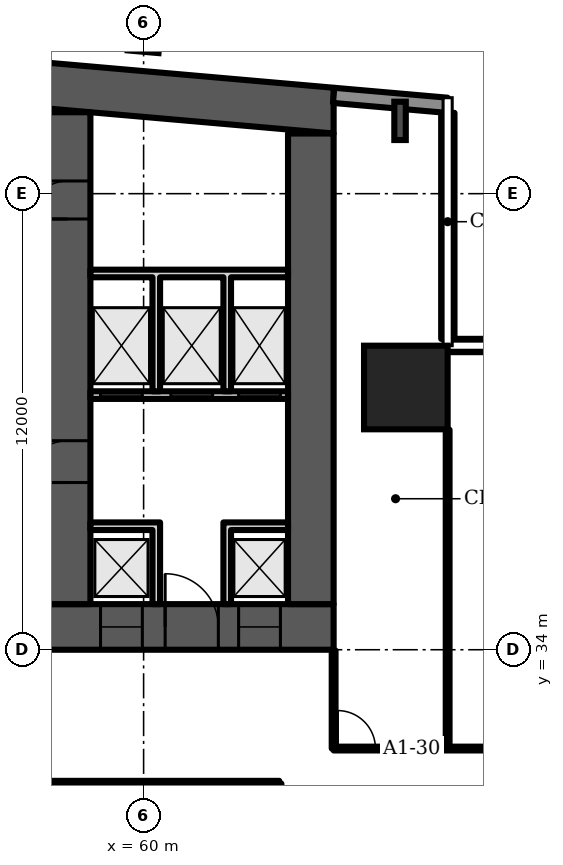
"""IFC4 building model, lengths in metres.
Left out: names, types, materials, properties, quantities, classifications, styles, units other than length and angle.
Written with IfcOpenShell. Run it as: python <this file> out.ifc"""

import sys

from ifc_helpers import new_model, si_unit, direction, frame, frame_2d, origin, origin_2d, place, context, subcontext, project, spatial, polyline, rectangle, i_section, outline, extrude, element, fill, save


model = new_model("IFC4")
c1 = context("Model", 3, precision=1e-05, world=origin(), true_north=direction((0.0, 1.0)))
c2 = subcontext(c1, "Body", "Model", "MODEL_VIEW")
j1 = project(units=[si_unit("LENGTHUNIT", "METRE"), si_unit("PLANEANGLEUNIT", "RADIAN")], contexts=[c1])
p1 = place(None, origin())
s1 = spatial("IfcSite", under=j1, at=p1, CompositionType="ELEMENT")
p2 = place(p1, origin())
s2 = spatial("IfcBuilding", under=s1, at=p2, CompositionType="ELEMENT")
p3 = place(p2, frame((0.0, 0.0, 45.1)))
s3 = spatial("IfcBuildingStorey", under=s2, at=p3, CompositionType="ELEMENT", Elevation=45.1)
p4 = place(p3, frame((0.0, 0.0, -0.0)))
e1 = element("IfcWall", 1, at=p4, inside=s3, PredefinedType="SHEAR", context=c2, shape_type="SweptSolid", body=[
    extrude(outline(polyline([(9.0, 47.583), (37.0, 50.032), (65.0, 47.583), (65.0, 48.787), (37.0, 51.237), (9.0, 48.787), (9.0, 47.583)])), origin(), (0.0, 0.0, 1.0), 3.6),
])
p5 = place(p3, frame((9.0, 34.6, 0.0), z_axis=(0.0, 0.0, 1.0), x_axis=(1.0, 0.0, 0.0)))
e2 = element("IfcWall", 2, at=p5, inside=s3, PredefinedType="SHEAR", context=c2, shape_type="SweptSolid", body=[
    extrude(rectangle(XDim=56.0, YDim=1.2, at=frame_2d((28.0, 0.0))), origin(), (0.0, 0.0, 1.0), 3.6),
])
p6 = place(p5, frame((2.0, 0.0, 0.0)))
e3 = element("IfcOpeningElement", 3, at=p6, cuts=e2, PredefinedType="OPENING", context=c2, shape_type="SweptSolid", body=[
    extrude(rectangle(XDim=1.0, YDim=2.1, at=frame_2d((0.5, 1.05))), frame((0.0, 0.61, 0.0), z_axis=(0.0, -1.0, 0.0), x_axis=(1.0, 0.0, 0.0)), (0.0, 0.0, 1.0), 1.22),
])
p7 = place(p5, frame((4.6, 0.0, 0.0)))
e4 = element("IfcOpeningElement", 4, at=p7, cuts=e2, PredefinedType="OPENING", context=c2, shape_type="SweptSolid", body=[
    extrude(rectangle(XDim=1.0, YDim=2.1, at=frame_2d((0.5, 1.05))), frame((0.0, 0.61, 0.0), z_axis=(0.0, -1.0, 0.0), x_axis=(1.0, 0.0, 0.0)), (0.0, 0.0, 1.0), 1.22),
])
p8 = place(p5, frame((7.867, 0.0, 0.0)))
e5 = element("IfcOpeningElement", 5, at=p8, cuts=e2, PredefinedType="OPENING", context=c2, shape_type="SweptSolid", body=[
    extrude(rectangle(XDim=1.1, YDim=2.1, at=frame_2d((0.55, 1.05))), frame((0.0, 0.61, 0.0), z_axis=(0.0, -1.0, 0.0), x_axis=(1.0, 0.0, 0.0)), (0.0, 0.0, 1.0), 1.22),
])
p9 = place(p5, frame((12.033, 0.0, 0.0)))
e6 = element("IfcOpeningElement", 6, at=p9, cuts=e2, PredefinedType="OPENING", context=c2, shape_type="SweptSolid", body=[
    extrude(rectangle(XDim=1.1, YDim=2.1, at=frame_2d((0.55, 1.05))), frame((0.0, 0.61, 0.0), z_axis=(0.0, -1.0, 0.0), x_axis=(1.0, 0.0, 0.0)), (0.0, 0.0, 1.0), 1.22),
])
p10 = place(p5, frame((9.8, 0.0, 0.0)))
e7 = element("IfcOpeningElement", 7, at=p10, cuts=e2, PredefinedType="OPENING", context=c2, shape_type="SweptSolid", body=[
    extrude(rectangle(XDim=1.4, YDim=2.1, at=frame_2d((0.7, 1.05))), frame((0.0, 0.61, 0.0), z_axis=(0.0, -1.0, 0.0), x_axis=(1.0, 0.0, 0.0)), (0.0, 0.0, 1.0), 1.22),
])
p11 = place(p5, frame((14.65, 0.0, 0.0)))
e8 = element("IfcOpeningElement", 8, at=p11, cuts=e2, PredefinedType="OPENING", context=c2, shape_type="SweptSolid", body=[
    extrude(rectangle(XDim=1.2, YDim=2.1, at=frame_2d((0.6, 1.05))), frame((0.0, 0.61, 0.0), z_axis=(0.0, -1.0, 0.0), x_axis=(1.0, 0.0, 0.0)), (0.0, 0.0, 1.0), 1.22),
])
p12 = place(p5, frame((21.867, 0.0, 0.0)))
e9 = element("IfcOpeningElement", 9, at=p12, cuts=e2, PredefinedType="OPENING", context=c2, shape_type="SweptSolid", body=[
    extrude(rectangle(XDim=1.1, YDim=2.1, at=frame_2d((0.55, 1.05))), frame((0.0, 0.61, 0.0), z_axis=(0.0, -1.0, 0.0), x_axis=(1.0, 0.0, 0.0)), (0.0, 0.0, 1.0), 1.22),
])
p13 = place(p5, frame((26.033, 0.0, 0.0)))
e10 = element("IfcOpeningElement", 10, at=p13, cuts=e2, PredefinedType="OPENING", context=c2, shape_type="SweptSolid", body=[
    extrude(rectangle(XDim=1.1, YDim=2.1, at=frame_2d((0.55, 1.05))), frame((0.0, 0.61, 0.0), z_axis=(0.0, -1.0, 0.0), x_axis=(1.0, 0.0, 0.0)), (0.0, 0.0, 1.0), 1.22),
])
p14 = place(p5, frame((23.8, 0.0, 0.0)))
e11 = element("IfcOpeningElement", 11, at=p14, cuts=e2, PredefinedType="OPENING", context=c2, shape_type="SweptSolid", body=[
    extrude(rectangle(XDim=1.4, YDim=2.1, at=frame_2d((0.7, 1.05))), frame((0.0, 0.61, 0.0), z_axis=(0.0, -1.0, 0.0), x_axis=(1.0, 0.0, 0.0)), (0.0, 0.0, 1.0), 1.22),
])
p15 = place(p5, frame((28.867, 0.0, 0.0)))
e12 = element("IfcOpeningElement", 12, at=p15, cuts=e2, PredefinedType="OPENING", context=c2, shape_type="SweptSolid", body=[
    extrude(rectangle(XDim=1.1, YDim=2.1, at=frame_2d((0.55, 1.05))), frame((0.0, 0.61, 0.0), z_axis=(0.0, -1.0, 0.0), x_axis=(1.0, 0.0, 0.0)), (0.0, 0.0, 1.0), 1.22),
])
p16 = place(p5, frame((33.033, 0.0, 0.0)))
e13 = element("IfcOpeningElement", 13, at=p16, cuts=e2, PredefinedType="OPENING", context=c2, shape_type="SweptSolid", body=[
    extrude(rectangle(XDim=1.1, YDim=2.1, at=frame_2d((0.55, 1.05))), frame((0.0, 0.61, 0.0), z_axis=(0.0, -1.0, 0.0), x_axis=(1.0, 0.0, 0.0)), (0.0, 0.0, 1.0), 1.22),
])
p17 = place(p5, frame((40.15, 0.0, 0.0)))
e14 = element("IfcOpeningElement", 14, at=p17, cuts=e2, PredefinedType="OPENING", context=c2, shape_type="SweptSolid", body=[
    extrude(rectangle(XDim=1.2, YDim=2.1, at=frame_2d((0.6, 1.05))), frame((0.0, 0.61, 0.0), z_axis=(0.0, -1.0, 0.0), x_axis=(1.0, 0.0, 0.0)), (0.0, 0.0, 1.0), 1.22),
])
p18 = place(p5, frame((44.8, 0.0, 0.0)))
e15 = element("IfcOpeningElement", 15, at=p18, cuts=e2, PredefinedType="OPENING", context=c2, shape_type="SweptSolid", body=[
    extrude(rectangle(XDim=1.4, YDim=2.1, at=frame_2d((0.7, 1.05))), frame((0.0, 0.61, 0.0), z_axis=(0.0, -1.0, 0.0), x_axis=(1.0, 0.0, 0.0)), (0.0, 0.0, 1.0), 1.22),
])
p19 = place(p5, frame((49.867, 0.0, 0.0)))
e16 = element("IfcOpeningElement", 16, at=p19, cuts=e2, PredefinedType="OPENING", context=c2, shape_type="SweptSolid", body=[
    extrude(rectangle(XDim=1.1, YDim=2.1, at=frame_2d((0.55, 1.05))), frame((0.0, 0.61, 0.0), z_axis=(0.0, -1.0, 0.0), x_axis=(1.0, 0.0, 0.0)), (0.0, 0.0, 1.0), 1.22),
])
p20 = place(p5, frame((53.5, 0.0, 0.0)))
e17 = element("IfcOpeningElement", 17, at=p20, cuts=e2, PredefinedType="OPENING", context=c2, shape_type="SweptSolid", body=[
    extrude(rectangle(XDim=1.1, YDim=2.1, at=frame_2d((0.55, 1.05))), frame((0.0, 0.61, 0.0), z_axis=(0.0, -1.0, 0.0), x_axis=(1.0, 0.0, 0.0)), (0.0, 0.0, 1.0), 1.22),
])
p21 = place(p5, frame((51.567, 0.0, 0.0)))
e18 = element("IfcOpeningElement", 18, at=p21, cuts=e2, PredefinedType="OPENING", context=c2, shape_type="SweptSolid", body=[
    extrude(rectangle(XDim=1.4, YDim=2.1, at=frame_2d((0.7, 1.05))), frame((0.0, 0.61, 0.0), z_axis=(0.0, -1.0, 0.0), x_axis=(1.0, 0.0, 0.0)), (0.0, 0.0, 1.0), 1.22),
])
p22 = place(p3, frame((58.0, 35.2, 0.0), z_axis=(0.0, 0.0, 1.0), x_axis=(0.0, 1.0, 0.0)))
e19 = element("IfcWall", 19, at=p22, inside=s3, PredefinedType="SHEAR", context=c2, shape_type="SweptSolid", body=[
    extrude(rectangle(XDim=12.943, YDim=1.2, at=frame_2d((6.471, 0.0))), origin(), (0.0, 0.0, 1.0), 3.6),
])
p23 = place(p22, frame((10.134, 0.0, 0.0)))
e20 = element("IfcOpeningElement", 20, at=p23, cuts=e19, PredefinedType="OPENING", context=c2, shape_type="SweptSolid", body=[
    extrude(rectangle(XDim=1.0, YDim=2.1, at=frame_2d((0.5, 1.05))), frame((0.0, 0.61, 0.0), z_axis=(0.0, -1.0, 0.0), x_axis=(1.0, 0.0, 0.0)), (0.0, 0.0, 1.0), 1.22),
])
p24 = place(p22, frame((3.2, 0.0, 0.0)))
e21 = element("IfcOpeningElement", 21, at=p24, cuts=e19, PredefinedType="OPENING", context=c2, shape_type="SweptSolid", body=[
    extrude(rectangle(XDim=1.1, YDim=2.1, at=frame_2d((0.55, 1.05))), frame((0.0, 0.61, 0.0), z_axis=(0.0, -1.0, 0.0), x_axis=(1.0, 0.0, 0.0)), (0.0, 0.0, 1.0), 1.22),
])
p25 = place(p3, frame((64.4, 35.2, 0.0), z_axis=(0.0, 0.0, 1.0), x_axis=(0.0, 1.0, 0.0)))
e22 = element("IfcWall", 22, at=p25, inside=s3, PredefinedType="SHEAR", context=c2, shape_type="SweptSolid", body=[
    extrude(rectangle(XDim=12.383, YDim=1.2, at=frame_2d((6.191, 0.0))), origin(), (0.0, 0.0, 1.0), 3.6),
])
p26 = place(p3, frame((66.9, 40.9, 0.0), z_axis=(0.0, 0.0, 1.0), x_axis=(1.0, 0.0, 0.0)))
e23 = element("IfcColumn", 23, at=p26, inside=s3, PredefinedType="COLUMN", context=c2, shape_type="SweptSolid", body=[
    extrude(rectangle(XDim=2.2, YDim=2.2, at=origin_2d()), origin(), (0.0, 0.0, 1.0), 3.6),
])
p27 = place(p3, frame((66.748, 47.915, 0.0), z_axis=(0.0, 0.0, 1.0), x_axis=(1.0, 0.0, 0.0)))
e24 = element("IfcColumn", 24, at=p27, inside=s3, PredefinedType="COLUMN", context=c2, shape_type="SweptSolid", body=[
    extrude(i_section(OverallWidth=0.302, OverallDepth=1.008, WebThickness=0.021, FlangeThickness=0.04, FilletRadius=0.03, at=origin_2d()), origin(), (0.0, 0.0, 1.0), 3.6),
])
p28 = place(p3, frame((60.0, 49.885, 0.0), z_axis=(0.0, 0.0, 1.0), x_axis=(0.087156, 0.996197, 0.0)))
e25 = element("IfcColumn", 25, at=p28, inside=s3, PredefinedType="COLUMN", context=c2, shape_type="SweptSolid", body=[
    extrude(i_section(OverallWidth=0.303, OverallDepth=0.814, WebThickness=0.021, FlangeThickness=0.04, FilletRadius=0.03, at=origin_2d()), origin(), (0.0, 0.0, 1.0), 3.6),
])
p29 = place(p3, frame((67.983, 48.326, 0.0), z_axis=(0.0, 0.0, 1.0), x_axis=(-0.996194, 0.087168, 0.0)))
e26 = element("IfcWall", 26, at=p29, inside=s3, PredefinedType="SOLIDWALL", context=c2, shape_type="SweptSolid", body=[
    extrude(rectangle(XDim=2.994, YDim=0.4, at=frame_2d((1.497, 0.0))), origin(), (0.0, 0.0, 1.0), 3.2),
])
p30 = place(p3, frame((76.047, 42.005, 0.0), z_axis=(0.0, 0.0, 1.0), x_axis=(-1.0, 0.0, 0.0)))
e27 = element("IfcWall", 27, at=p30, inside=s3, PredefinedType="SOLIDWALL", context=c2, shape_type="SweptSolid", body=[
    extrude(rectangle(XDim=8.047, YDim=0.35, at=frame_2d((4.023, 0.0))), origin(), (0.0, 0.0, 1.0), 1.0),
])
p31 = place(p3, frame((68.005, 42.18, 0.0), z_axis=(0.0, 0.0, 1.0), x_axis=(0.0, 1.0, 0.0)))
e28 = element("IfcWall", 28, at=p31, inside=s3, PredefinedType="SOLIDWALL", context=c2, shape_type="SweptSolid", body=[
    extrude(rectangle(XDim=5.947, YDim=0.35, at=frame_2d((2.973, 0.0))), origin(), (0.0, 0.0, 1.0), 1.0),
])
p32 = place(p3, frame((58.6, 40.7, 0.0), z_axis=(0.0, 0.0, 1.0), x_axis=(1.0, 0.0, 0.0)))
e29 = element("IfcWall", 29, at=p32, inside=s3, PredefinedType="PARTITIONING", context=c2, shape_type="SweptSolid", body=[
    extrude(rectangle(XDim=5.2, YDim=0.2, at=frame_2d((2.6, 0.0))), origin(), (0.0, 0.0, 1.0), 3.2),
])
p33 = place(p32, frame((0.267, 0.0, 0.0)))
e30 = element("IfcOpeningElement", 30, at=p33, cuts=e29, PredefinedType="OPENING", context=c2, shape_type="SweptSolid", body=[
    extrude(rectangle(XDim=1.1, YDim=2.1, at=frame_2d((0.55, 1.05))), frame((0.0, 0.11, 0.0), z_axis=(0.0, -1.0, 0.0), x_axis=(1.0, 0.0, 0.0)), (0.0, 0.0, 1.0), 0.22),
])
p34 = place(p32, frame((2.117, 0.0, 0.0)))
e31 = element("IfcOpeningElement", 31, at=p34, cuts=e29, PredefinedType="OPENING", context=c2, shape_type="SweptSolid", body=[
    extrude(rectangle(XDim=1.1, YDim=2.1, at=frame_2d((0.55, 1.05))), frame((0.0, 0.11, 0.0), z_axis=(0.0, -1.0, 0.0), x_axis=(1.0, 0.0, 0.0)), (0.0, 0.0, 1.0), 0.22),
])
p35 = place(p32, frame((3.9, 0.0, 0.0)))
e32 = element("IfcOpeningElement", 32, at=p35, cuts=e29, PredefinedType="OPENING", context=c2, shape_type="SweptSolid", body=[
    extrude(rectangle(XDim=1.1, YDim=2.1, at=frame_2d((0.55, 1.05))), frame((0.0, 0.11, 0.0), z_axis=(0.0, -1.0, 0.0), x_axis=(1.0, 0.0, 0.0)), (0.0, 0.0, 1.0), 0.22),
])
p36 = place(p3, frame((0.0, 0.0, -0.0)))
e33 = element("IfcWall", 33, at=p36, inside=s3, PredefinedType="PARTITIONING", context=c2, shape_type="SweptSolid", body=[
    extrude(outline(polyline([(60.233, 37.15), (58.6, 37.15), (58.6, 37.35), (60.233, 37.35), (60.433, 37.35), (60.433, 35.2), (60.233, 35.2), (60.233, 37.15)])), origin(), (0.0, 0.0, 1.0), 3.2),
])
p37 = place(p3, frame((0.0, 0.0, -0.0)))
e34 = element("IfcWall", 34, at=p37, inside=s3, PredefinedType="PARTITIONING", context=c2, shape_type="SweptSolid", body=[
    extrude(outline(polyline([(62.1, 37.35), (62.3, 37.35), (63.8, 37.35), (63.8, 37.15), (62.3, 37.15), (62.3, 35.2), (62.1, 35.2), (62.1, 37.35)])), origin(), (0.0, 0.0, 1.0), 3.2),
])
p38 = place(p3, frame((0.0, 0.0, -0.0)))
e35 = element("IfcWall", 35, at=p38, inside=s3, PredefinedType="PARTITIONING", context=c2, shape_type="SweptSolid", body=[
    extrude(outline(polyline([(60.433, 40.8), (60.233, 40.8), (60.233, 43.8), (58.6, 43.8), (58.6, 44.0), (63.8, 44.0), (63.8, 43.8), (62.3, 43.8), (62.3, 40.8), (62.1, 40.8), (62.1, 43.8), (60.433, 43.8), (60.433, 40.8)])), origin(), (0.0, 0.0, 1.0), 3.2),
])
p39 = place(p3, frame((57.67, 14.24, 0.0), z_axis=(0.0, 0.0, 1.0), x_axis=(0.0, 1.0, 0.0)))
e36 = element("IfcWall", 36, at=p39, inside=s3, PredefinedType="PARTITIONING", context=c2, shape_type="SweptSolid", body=[
    extrude(rectangle(XDim=16.26, YDim=0.1, at=frame_2d((8.13, 0.0))), origin(), (0.0, 0.0, 1.0), 3.2),
])
p40 = place(p3, frame((63.57, 14.245, 0.0), z_axis=(0.0, 0.0, 1.0), x_axis=(0.000331, 1.000002, 0.0)))
e37 = element("IfcWall", 37, at=p40, inside=s3, PredefinedType="PARTITIONING", context=c2, shape_type="SweptSolid", body=[
    extrude(rectangle(XDim=16.233, YDim=0.1, at=frame_2d((8.117, 0.0))), origin(), (0.0, 0.0, 1.0), 3.2),
])
p41 = place(p3, frame((65.0, 31.4, 0.0), z_axis=(0.0, 0.0, 1.0), x_axis=(0.0, 1.0, 0.0)))
e38 = element("IfcWall", 38, at=p41, inside=s3, PredefinedType="PARTITIONING", context=c2, shape_type="SweptSolid", body=[
    extrude(rectangle(XDim=2.58, YDim=0.1, at=frame_2d((1.29, 0.0))), origin(), (0.0, 0.0, 1.0), 3.2),
])
p42 = place(p3, frame((65.0, 31.4, 0.0), z_axis=(0.0, 0.0, 1.0), x_axis=(1.0, 0.0, 0.0)))
e39 = element("IfcWall", 39, at=p42, inside=s3, PredefinedType="PARTITIONING", context=c2, shape_type="SweptSolid", body=[
    extrude(rectangle(XDim=7.125, YDim=0.1, at=frame_2d((3.562, 0.0))), origin(), (0.0, 0.0, 1.0), 3.2),
])
p43 = place(p42, frame((0.1, 0.0, 0.0)))
e40 = element("IfcOpeningElement", 40, at=p43, cuts=e39, PredefinedType="OPENING", context=c2, shape_type="SweptSolid", body=[
    extrude(rectangle(XDim=1.0, YDim=2.1, at=frame_2d((0.5, 1.05))), frame((0.0, 0.06, 0.0), z_axis=(0.0, -1.0, 0.0), x_axis=(1.0, 0.0, 0.0)), (0.0, 0.0, 1.0), 0.12),
])
p44 = place(p42, frame((5.625, 0.0, 0.0)))
e41 = element("IfcOpeningElement", 41, at=p44, cuts=e39, PredefinedType="OPENING", context=c2, shape_type="SweptSolid", body=[
    extrude(rectangle(XDim=1.0, YDim=2.1, at=frame_2d((0.5, 1.05))), frame((0.0, 0.06, 0.0), z_axis=(0.0, -1.0, 0.0), x_axis=(1.0, 0.0, 0.0)), (0.0, 0.0, 1.0), 0.12),
])
p45 = place(p3, frame((68.0, 31.4, 0.0), z_axis=(0.0, 0.0, 1.0), x_axis=(0.0, 1.0, 0.0)))
e42 = element("IfcWall", 42, at=p45, inside=s3, PredefinedType="PARTITIONING", context=c2, shape_type="SweptSolid", body=[
    extrude(rectangle(XDim=8.39, YDim=0.1, at=frame_2d((4.195, 0.0))), origin(), (0.0, 0.0, 1.0), 3.2),
])
p46 = place(p3, frame((44.15, 30.5, 0.0), z_axis=(0.0, 0.0, 1.0), x_axis=(1.0, 0.0, 0.0)))
e43 = element("IfcWall", 43, at=p46, inside=s3, PredefinedType="PARTITIONING", context=c2, shape_type="SweptSolid", body=[
    extrude(rectangle(XDim=19.42, YDim=0.1, at=frame_2d((9.71, 0.0))), origin(), (0.0, 0.0, 1.0), 3.2),
])
p47 = place(p46, frame((15.54, 0.0, 0.0)))
e44 = element("IfcOpeningElement", 44, at=p47, cuts=e43, PredefinedType="OPENING", context=c2, shape_type="SweptSolid", body=[
    extrude(rectangle(XDim=1.0, YDim=2.1, at=frame_2d((0.5, 1.05))), frame((0.0, 0.06, 0.0), z_axis=(0.0, -1.0, 0.0), x_axis=(1.0, 0.0, 0.0)), (0.0, 0.0, 1.0), 0.12),
])
p48 = place(p19, origin())
e45 = element("IfcDoor", 45, at=p48, inside=s3, OperationType="DOUBLE_DOOR_SLIDING", PredefinedType="DOOR", context=c2, shape_type="SweptSolid", body=[
    extrude(rectangle(XDim=1.1, YDim=2.1, at=frame_2d((0.55, 1.05))), frame((0.0, 0.025, 0.0), z_axis=(0.0, -1.0, 0.0), x_axis=(1.0, 0.0, 0.0)), (0.0, 0.0, 1.0), 0.05),
])
fill(e16, e45)
p49 = place(p20, origin())
e46 = element("IfcDoor", 46, at=p49, inside=s3, OperationType="DOUBLE_DOOR_SLIDING", PredefinedType="DOOR", context=c2, shape_type="SweptSolid", body=[
    extrude(rectangle(XDim=1.1, YDim=2.1, at=frame_2d((0.55, 1.05))), frame((0.0, 0.025, 0.0), z_axis=(0.0, -1.0, 0.0), x_axis=(1.0, 0.0, 0.0)), (0.0, 0.0, 1.0), 0.05),
])
fill(e17, e46)
p50 = place(p21, origin())
e47 = element("IfcDoor", 47, at=p50, inside=s3, OperationType="DOUBLE_DOOR_SINGLE_SWING", PredefinedType="DOOR", context=c2, shape_type="SweptSolid", body=[
    extrude(rectangle(XDim=1.4, YDim=2.1, at=frame_2d((0.7, 1.05))), frame((0.0, 0.025, 0.0), z_axis=(0.0, -1.0, 0.0), x_axis=(1.0, 0.0, 0.0)), (0.0, 0.0, 1.0), 0.05),
])
fill(e18, e47)
p51 = place(p33, origin())
e48 = element("IfcDoor", 48, at=p51, inside=s3, OperationType="DOUBLE_DOOR_SLIDING", PredefinedType="DOOR", context=c2, shape_type="SweptSolid", body=[
    extrude(rectangle(XDim=1.1, YDim=2.1, at=frame_2d((0.55, 1.05))), frame((0.0, 0.025, 0.0), z_axis=(0.0, -1.0, 0.0), x_axis=(1.0, 0.0, 0.0)), (0.0, 0.0, 1.0), 0.05),
])
fill(e30, e48)
p52 = place(p34, origin())
e49 = element("IfcDoor", 49, at=p52, inside=s3, OperationType="DOUBLE_DOOR_SLIDING", PredefinedType="DOOR", context=c2, shape_type="SweptSolid", body=[
    extrude(rectangle(XDim=1.1, YDim=2.1, at=frame_2d((0.55, 1.05))), frame((0.0, 0.025, 0.0), z_axis=(0.0, -1.0, 0.0), x_axis=(1.0, 0.0, 0.0)), (0.0, 0.0, 1.0), 0.05),
])
fill(e31, e49)
p53 = place(p35, origin())
e50 = element("IfcDoor", 50, at=p53, inside=s3, OperationType="DOUBLE_DOOR_SLIDING", PredefinedType="DOOR", context=c2, shape_type="SweptSolid", body=[
    extrude(rectangle(XDim=1.1, YDim=2.1, at=frame_2d((0.55, 1.05))), frame((0.0, 0.025, 0.0), z_axis=(0.0, -1.0, 0.0), x_axis=(1.0, 0.0, 0.0)), (0.0, 0.0, 1.0), 0.05),
])
fill(e32, e50)
p54 = place(p23, origin())
e51 = element("IfcDoor", 51, at=p54, inside=s3, OperationType="SINGLE_SWING_LEFT", PredefinedType="DOOR", context=c2, shape_type="SweptSolid", body=[
    extrude(rectangle(XDim=1.0, YDim=2.1, at=frame_2d((0.5, 1.05))), frame((0.0, 0.6, 0.0), z_axis=(0.0, -1.0, 0.0), x_axis=(1.0, 0.0, 0.0)), (0.0, 0.0, 1.0), 1.199),
])
fill(e20, e51)
p55 = place(p24, origin())
e52 = element("IfcDoor", 52, at=p55, inside=s3, OperationType="SINGLE_SWING_LEFT", PredefinedType="DOOR", context=c2, shape_type="SweptSolid", body=[
    extrude(rectangle(XDim=1.1, YDim=2.1, at=frame_2d((0.55, 1.05))), frame((0.0, 0.025, 0.0), z_axis=(0.0, -1.0, 0.0), x_axis=(1.0, 0.0, 0.0)), (0.0, 0.0, 1.0), 0.05),
])
fill(e21, e52)
p56 = place(p47, origin())
e53 = element("IfcDoor", 53, at=p56, inside=s3, OperationType="SINGLE_SWING_RIGHT", PredefinedType="DOOR", context=c2, shape_type="SweptSolid", body=[
    extrude(rectangle(XDim=1.0, YDim=2.1, at=frame_2d((0.5, 1.05))), frame((0.0, 0.025, 0.0), z_axis=(0.0, -1.0, 0.0), x_axis=(1.0, 0.0, 0.0)), (0.0, 0.0, 1.0), 0.05),
])
fill(e44, e53)
p57 = place(p43, origin())
e54 = element("IfcDoor", 54, at=p57, inside=s3, OperationType="SINGLE_SWING_LEFT", PredefinedType="DOOR", context=c2, shape_type="SweptSolid", body=[
    extrude(rectangle(XDim=1.0, YDim=2.1, at=frame_2d((0.5, 1.05))), frame((0.0, 0.025, 0.0), z_axis=(0.0, -1.0, 0.0), x_axis=(1.0, 0.0, 0.0)), (0.0, 0.0, 1.0), 0.05),
])
fill(e40, e54)
save(model, sys.argv[1])
